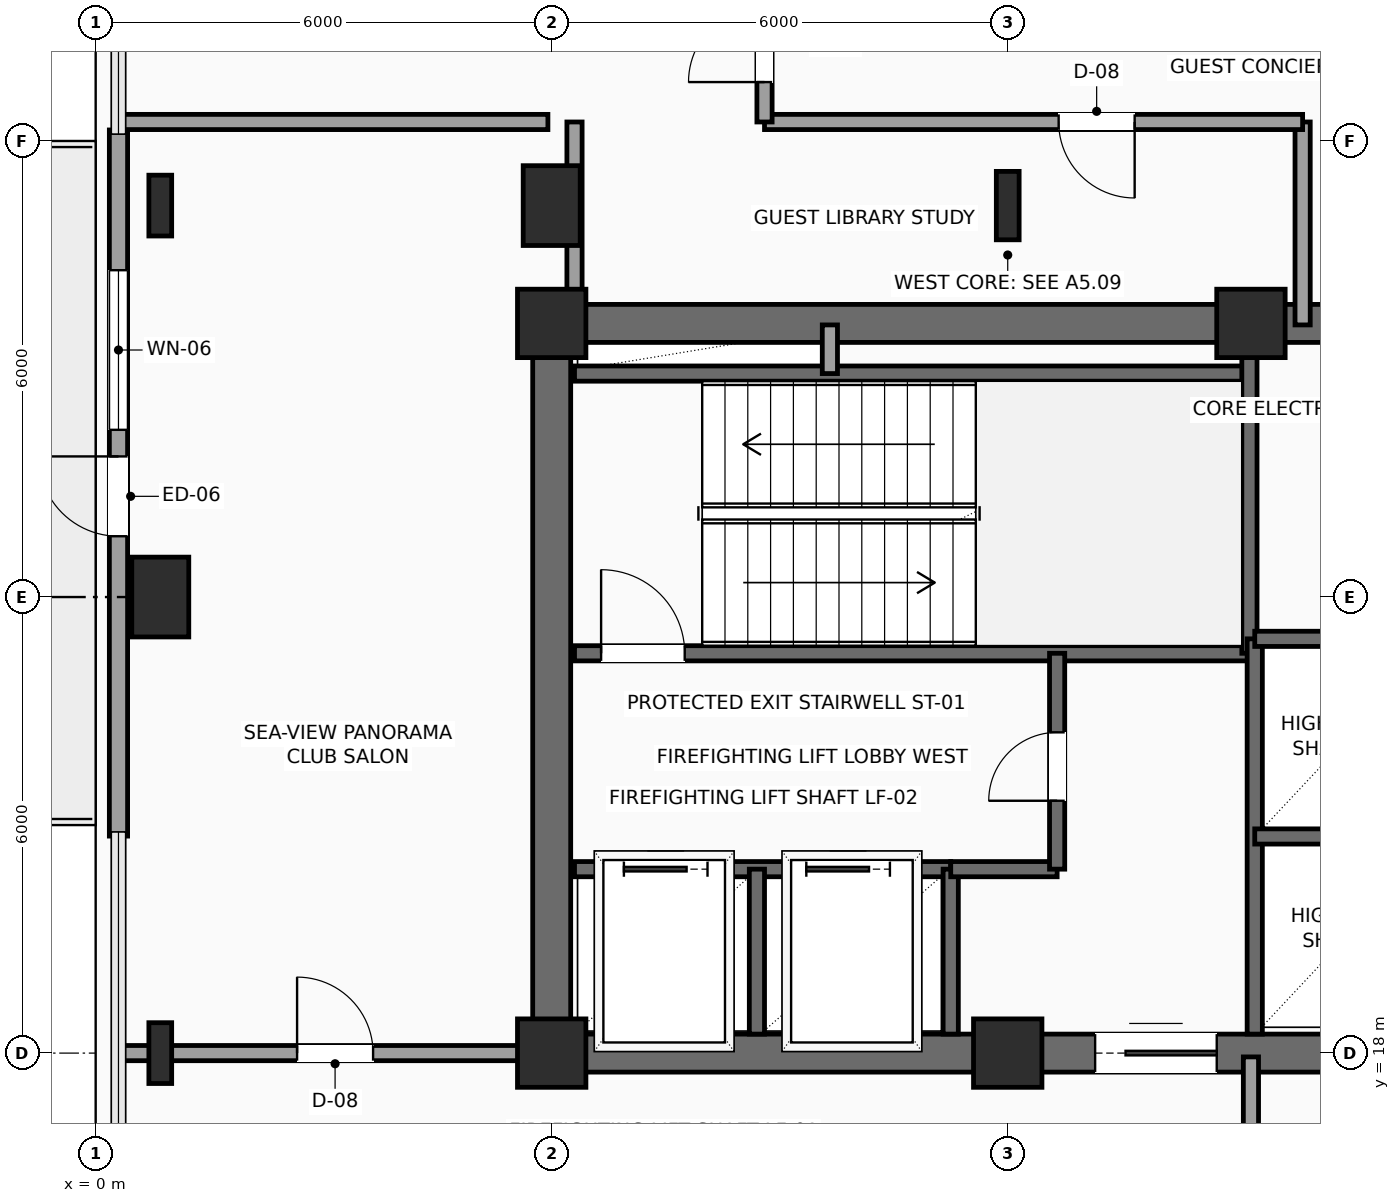
"""IFC4 building model, lengths in metres.
Left out: names, types, materials, properties, quantities, classifications, styles, units other than length and angle.
Written with IfcOpenShell. Run it as: python <this file> out.ifc"""

import sys

from ifc_helpers import new_model, si_unit, direction, frame, frame_2d, origin, origin_2d, place, context, subcontext, project, spatial, rectangle, i_section, extrude, element, fill, save


model = new_model("IFC4")
c1 = context("Model", 3, precision=1e-05, world=origin(), true_north=direction((0.0, 1.0)))
c2 = subcontext(c1, "Body", "Model", "MODEL_VIEW")
j1 = project(units=[si_unit("LENGTHUNIT", "METRE"), si_unit("PLANEANGLEUNIT", "RADIAN")], contexts=[c1])
p1 = place(None, origin())
s1 = spatial("IfcSite", under=j1, at=p1, CompositionType="ELEMENT")
p2 = place(p1, origin())
s2 = spatial("IfcBuilding", under=s1, at=p2, CompositionType="ELEMENT")
p3 = place(p2, frame((0.0, 0.0, 169.2)))
s3 = spatial("IfcBuildingStorey", under=s2, at=p3, CompositionType="ELEMENT", Elevation=169.2)
for number, where, z_axis, x_axis in (
    (1, (6.0, 18.0, 0.0), (0.0, 0.0, 1.0), (1.0, 0.0, 0.0)),
    (2, (12.0, 18.0, 0.0), (0.0, 0.0, 1.0), (1.0, 0.0, 0.0)),
    (3, (6.0, 27.6, 0.0), (0.0, 0.0, 1.0), (1.0, 0.0, 0.0)),
    (4, (15.2, 27.6, 0.0), (0.0, 0.0, 1.0), (1.0, 0.0, 0.0)),
):
    element("IfcColumn", number, at=place(p3, frame(where, z_axis=z_axis, x_axis=x_axis)), inside=s3, PredefinedType="COLUMN", context=c2, shape_type="SweptSolid", body=[
        extrude(rectangle(XDim=0.9, YDim=0.9, at=origin_2d()), origin(), (0.0, 0.0, 1.0), 3.75),
    ])
p4 = place(p3, frame((0.85, 18.0, 0.0), z_axis=(0.0, 0.0, 1.0), x_axis=(1.0, 0.0, 0.0)))
e5 = element("IfcColumn", 5, at=p4, inside=s3, PredefinedType="COLUMN", context=c2, shape_type="SweptSolid", body=[
    extrude(i_section(OverallWidth=0.3, OverallDepth=0.8, WebThickness=0.018, FlangeThickness=0.033, FilletRadius=0.03, at=origin_2d()), origin(), (0.0, 0.0, 1.0), 3.75),
])
p5 = place(p3, frame((0.85, 24.0, 0.0), z_axis=(0.0, 0.0, 1.0), x_axis=(1.0, 0.0, 0.0)))
e6 = element("IfcColumn", 6, at=p5, inside=s3, PredefinedType="COLUMN", context=c2, shape_type="SweptSolid", body=[
    extrude(rectangle(XDim=0.75, YDim=1.05, at=origin_2d()), origin(), (0.0, 0.0, 1.0), 3.75),
])
p6 = place(p3, frame((0.85, 29.15, 0.0), z_axis=(0.0, 0.0, 1.0), x_axis=(1.0, 0.0, 0.0)))
e7 = element("IfcColumn", 7, at=p6, inside=s3, PredefinedType="COLUMN", context=c2, shape_type="SweptSolid", body=[
    extrude(i_section(OverallWidth=0.3, OverallDepth=0.8, WebThickness=0.018, FlangeThickness=0.033, FilletRadius=0.03, at=origin_2d()), origin(), (0.0, 0.0, 1.0), 3.75),
])
p7 = place(p3, frame((6.0, 29.15, 0.0), z_axis=(0.0, 0.0, 1.0), x_axis=(1.0, 0.0, 0.0)))
e8 = element("IfcColumn", 8, at=p7, inside=s3, PredefinedType="COLUMN", context=c2, shape_type="SweptSolid", body=[
    extrude(rectangle(XDim=0.75, YDim=1.05, at=origin_2d()), origin(), (0.0, 0.0, 1.0), 3.75),
])
p8 = place(p3, frame((12.0, 29.15, 0.0), z_axis=(0.0, 0.0, 1.0), x_axis=(1.0, 0.0, 0.0)))
e9 = element("IfcColumn", 9, at=p8, inside=s3, PredefinedType="COLUMN", context=c2, shape_type="SweptSolid", body=[
    extrude(i_section(OverallWidth=0.3, OverallDepth=0.9, WebThickness=0.019, FlangeThickness=0.035, FilletRadius=0.03, at=origin_2d()), origin(), (0.0, 0.0, 1.0), 3.75),
])
p9 = place(p3, frame((0.3, 20.855, 0.0), z_axis=(0.0, 0.0, 1.0), x_axis=(0.0, 1.0, 0.0)))
e10 = element("IfcWall", 10, at=p9, inside=s3, PredefinedType="SOLIDWALL", context=c2, shape_type="SweptSolid", body=[
    extrude(rectangle(XDim=9.29, YDim=0.24, at=frame_2d((4.645, 0.0))), origin(), (0.0, 0.0, 1.0), 3.54),
])
p10 = place(p9, frame((3.945, 0.0, 0.0)))
e11 = element("IfcOpeningElement", 11, at=p10, cuts=e10, PredefinedType="OPENING", context=c2, shape_type="SweptSolid", body=[
    extrude(rectangle(XDim=1.05, YDim=2.2, at=frame_2d((0.525, 1.1))), frame((0.0, 0.13, 0.0), z_axis=(0.0, -1.0, 0.0), x_axis=(1.0, 0.0, 0.0)), (0.0, 0.0, 1.0), 0.26),
])
p11 = place(p9, frame((5.345, 0.0, 0.85)))
e12 = element("IfcOpeningElement", 12, at=p11, cuts=e10, PredefinedType="OPENING", context=c2, shape_type="SweptSolid", body=[
    extrude(rectangle(XDim=2.1, YDim=2.2, at=frame_2d((1.05, 1.1))), frame((0.0, 0.13, 0.0), z_axis=(0.0, -1.0, 0.0), x_axis=(1.0, 0.0, 0.0)), (0.0, 0.0, 1.0), 0.26),
])
p12 = place(p3, frame((6.0, 18.0, 0.0), z_axis=(0.0, 0.0, 1.0), x_axis=(1.0, 0.0, 0.0)))
e13 = element("IfcWall", 13, at=p12, inside=s3, PredefinedType="SHEAR", context=c2, shape_type="SweptSolid", body=[
    extrude(rectangle(XDim=12.0, YDim=0.5, at=frame_2d((6.0, 0.0))), origin(), (0.0, 0.0, 1.0), 3.54),
])
p13 = place(p12, frame((7.15, 0.0, 0.0)))
e14 = element("IfcOpeningElement", 14, at=p13, cuts=e13, PredefinedType="OPENING", context=c2, shape_type="SweptSolid", body=[
    extrude(rectangle(XDim=1.6, YDim=2.3, at=frame_2d((0.8, 1.15))), frame((0.0, 0.26, 0.0), z_axis=(0.0, -1.0, 0.0), x_axis=(1.0, 0.0, 0.0)), (0.0, 0.0, 1.0), 0.52),
])
p14 = place(p3, frame((6.0, 27.6, 0.0), z_axis=(0.0, 0.0, 1.0), x_axis=(1.0, 0.0, 0.0)))
e15 = element("IfcWall", 15, at=p14, inside=s3, PredefinedType="SHEAR", context=c2, shape_type="SweptSolid", body=[
    extrude(rectangle(XDim=12.0, YDim=0.5, at=frame_2d((6.0, 0.0))), origin(), (0.0, 0.0, 1.0), 3.54),
])
p15 = place(p14, frame((10.2, 0.0, 0.0)))
e16 = element("IfcOpeningElement", 16, at=p15, cuts=e15, PredefinedType="OPENING", context=c2, shape_type="SweptSolid", body=[
    extrude(rectangle(XDim=0.9, YDim=2.15, at=frame_2d((0.45, 1.075))), frame((0.0, 0.26, 0.0), z_axis=(0.0, -1.0, 0.0), x_axis=(1.0, 0.0, 0.0)), (0.0, 0.0, 1.0), 0.52),
])
p16 = place(p3, frame((6.0, 18.0, 0.0), z_axis=(0.0, 0.0, 1.0), x_axis=(0.0, 1.0, 0.0)))
e17 = element("IfcWall", 17, at=p16, inside=s3, PredefinedType="SHEAR", context=c2, shape_type="SweptSolid", body=[
    extrude(rectangle(XDim=9.6, YDim=0.5, at=frame_2d((4.8, 0.0))), origin(), (0.0, 0.0, 1.0), 3.54),
])
p17 = place(p3, frame((6.3, 23.26, 0.0), z_axis=(0.0, 0.0, 1.0), x_axis=(1.0, 0.0, 0.0)))
e18 = element("IfcWall", 18, at=p17, inside=s3, PredefinedType="SHEAR", context=c2, shape_type="SweptSolid", body=[
    extrude(rectangle(XDim=8.88, YDim=0.2, at=frame_2d((4.44, 0.0))), origin(), (0.0, 0.0, 1.0), 3.54),
])
p18 = place(p17, frame((0.35, 0.0, 0.0)))
e19 = element("IfcOpeningElement", 19, at=p18, cuts=e18, PredefinedType="OPENING", context=c2, shape_type="SweptSolid", body=[
    extrude(rectangle(XDim=1.1, YDim=2.2, at=frame_2d((0.55, 1.1))), frame((0.0, 0.11, 0.0), z_axis=(0.0, -1.0, 0.0), x_axis=(1.0, 0.0, 0.0)), (0.0, 0.0, 1.0), 0.22),
])
p19 = place(p3, frame((6.3, 26.94, 0.0), z_axis=(0.0, 0.0, 1.0), x_axis=(1.0, 0.0, 0.0)))
e20 = element("IfcWall", 20, at=p19, inside=s3, PredefinedType="SHEAR", context=c2, shape_type="SweptSolid", body=[
    extrude(rectangle(XDim=8.88, YDim=0.2, at=frame_2d((4.44, 0.0))), origin(), (0.0, 0.0, 1.0), 3.54),
])
p20 = place(p3, frame((15.18, 23.26, 0.0), z_axis=(0.0, 0.0, 1.0), x_axis=(0.0, 1.0, 0.0)))
e21 = element("IfcWall", 21, at=p20, inside=s3, PredefinedType="SHEAR", context=c2, shape_type="SweptSolid", body=[
    extrude(rectangle(XDim=4.04, YDim=0.2, at=frame_2d((2.02, 0.0))), origin(), (0.0, 0.0, 1.0), 3.54),
])
p21 = place(p3, frame((6.3, 20.42, 0.0), z_axis=(0.0, 0.0, 1.0), x_axis=(1.0, 0.0, 0.0)))
e22 = element("IfcWall", 22, at=p21, inside=s3, PredefinedType="SHEAR", context=c2, shape_type="SweptSolid", body=[
    extrude(rectangle(XDim=4.95, YDim=0.2, at=frame_2d((2.475, 0.0))), origin(), (0.0, 0.0, 1.0), 3.54),
])
p22 = place(p21, frame((0.65, 0.0, 0.0)))
e23 = element("IfcOpeningElement", 23, at=p22, cuts=e22, PredefinedType="OPENING", context=c2, shape_type="SweptSolid", body=[
    extrude(rectangle(XDim=1.1, YDim=2.2, at=frame_2d((0.55, 1.1))), frame((0.0, 0.11, 0.0), z_axis=(0.0, -1.0, 0.0), x_axis=(1.0, 0.0, 0.0)), (0.0, 0.0, 1.0), 0.22),
])
p23 = place(p21, frame((3.05, 0.0, 0.0)))
e24 = element("IfcOpeningElement", 24, at=p23, cuts=e22, PredefinedType="OPENING", context=c2, shape_type="SweptSolid", body=[
    extrude(rectangle(XDim=1.1, YDim=2.2, at=frame_2d((0.55, 1.1))), frame((0.0, 0.11, 0.0), z_axis=(0.0, -1.0, 0.0), x_axis=(1.0, 0.0, 0.0)), (0.0, 0.0, 1.0), 0.22),
])
for number, where, z_axis, x_axis in (
    (25, (8.7, 18.25, 0.0), (0.0, 0.0, 1.0), (0.0, 1.0, 0.0)),
    (26, (11.25, 18.25, 0.0), (0.0, 0.0, 1.0), (0.0, 1.0, 0.0)),
):
    element("IfcWall", number, at=place(p3, frame(where, z_axis=z_axis, x_axis=x_axis)), inside=s3, PredefinedType="SHEAR", context=c2, shape_type="SweptSolid", body=[
        extrude(rectangle(XDim=2.17, YDim=0.2, at=frame_2d((1.085, 0.0))), origin(), (0.0, 0.0, 1.0), 3.54),
    ])
p24 = place(p3, frame((11.25, 20.42, 0.0), z_axis=(0.0, 0.0, 1.0), x_axis=(1.0, 0.0, 0.0)))
e27 = element("IfcWall", 27, at=p24, inside=s3, PredefinedType="SHEAR", context=c2, shape_type="SweptSolid", body=[
    extrude(rectangle(XDim=1.4, YDim=0.2, at=frame_2d((0.7, 0.0))), origin(), (0.0, 0.0, 1.0), 3.54),
])
p25 = place(p3, frame((12.65, 20.42, 0.0), z_axis=(0.0, 0.0, 1.0), x_axis=(0.0, 1.0, 0.0)))
e28 = element("IfcWall", 28, at=p25, inside=s3, PredefinedType="SHEAR", context=c2, shape_type="SweptSolid", body=[
    extrude(rectangle(XDim=2.84, YDim=0.2, at=frame_2d((1.42, 0.0))), origin(), (0.0, 0.0, 1.0), 3.54),
])
p26 = place(p25, frame((0.9, 0.0, 0.0)))
e29 = element("IfcOpeningElement", 29, at=p26, cuts=e28, PredefinedType="OPENING", context=c2, shape_type="SweptSolid", body=[
    extrude(rectangle(XDim=0.9, YDim=2.15, at=frame_2d((0.45, 1.075))), frame((0.0, 0.11, 0.0), z_axis=(0.0, -1.0, 0.0), x_axis=(1.0, 0.0, 0.0)), (0.0, 0.0, 1.0), 0.22),
])
p27 = place(p3, frame((9.66, 26.94, 0.0), z_axis=(0.0, 0.0, 1.0), x_axis=(0.0, 1.0, 0.0)))
e30 = element("IfcWall", 30, at=p27, inside=s3, PredefinedType="SOLIDWALL", context=c2, shape_type="SweptSolid", body=[
    extrude(rectangle(XDim=0.64, YDim=0.2, at=frame_2d((0.32, 0.0))), origin(), (0.0, 0.0, 1.0), 3.54),
])
p28 = place(p3, frame((15.25, 18.25, 0.0), z_axis=(0.0, 0.0, 1.0), x_axis=(0.0, 1.0, 0.0)))
e31 = element("IfcWall", 31, at=p28, inside=s3, PredefinedType="SHEAR", context=c2, shape_type="SweptSolid", body=[
    extrude(rectangle(XDim=5.2, YDim=0.2, at=frame_2d((2.6, 0.0))), origin(), (0.0, 0.0, 1.0), 3.54),
])
p29 = place(p3, frame((15.25, 20.85, 0.0), z_axis=(0.0, 0.0, 1.0), x_axis=(1.0, 0.0, 0.0)))
e32 = element("IfcWall", 32, at=p29, inside=s3, PredefinedType="SHEAR", context=c2, shape_type="SweptSolid", body=[
    extrude(rectangle(XDim=2.4, YDim=0.2, at=frame_2d((1.2, 0.0))), origin(), (0.0, 0.0, 1.0), 3.54),
])
p30 = place(p3, frame((15.25, 23.45, 0.0), z_axis=(0.0, 0.0, 1.0), x_axis=(1.0, 0.0, 0.0)))
e33 = element("IfcWall", 33, at=p30, inside=s3, PredefinedType="SHEAR", context=c2, shape_type="SweptSolid", body=[
    extrude(rectangle(XDim=2.45, YDim=0.2, at=frame_2d((1.225, 0.0))), origin(), (0.0, 0.0, 1.0), 3.54),
])
p31 = place(p3, frame((15.2, 17.95, 0.0), z_axis=(0.0, 0.0, 1.0), x_axis=(0.0, -1.0, 0.0)))
e34 = element("IfcWall", 34, at=p31, inside=s3, PredefinedType="PARTITIONING", context=c2, shape_type="SweptSolid", body=[
    extrude(rectangle(XDim=1.7, YDim=0.2, at=frame_2d((0.85, 0.0))), origin(), (0.0, 0.0, 1.0), 3.54),
])
p32 = place(p3, frame((15.88, 27.58, 0.0), z_axis=(0.0, 0.0, 1.0), x_axis=(0.0, 1.0, 0.0)))
e35 = element("IfcWall", 35, at=p32, inside=s3, PredefinedType="PARTITIONING", context=c2, shape_type="SweptSolid", body=[
    extrude(rectangle(XDim=2.67, YDim=0.2, at=frame_2d((1.335, 0.0))), origin(), (0.0, 0.0, 1.0), 3.54),
])
p33 = place(p3, frame((15.88, 30.25, 0.0), z_axis=(0.0, 0.0, 1.0), x_axis=(-1.0, 0.0, 0.0)))
e36 = element("IfcWall", 36, at=p33, inside=s3, PredefinedType="PARTITIONING", context=c2, shape_type="SweptSolid", body=[
    extrude(rectangle(XDim=7.08, YDim=0.2, at=frame_2d((3.54, 0.0))), origin(), (0.0, 0.0, 1.0), 3.54),
])
p34 = place(p33, frame((2.21, 0.0, 0.0)))
e37 = element("IfcOpeningElement", 37, at=p34, cuts=e36, PredefinedType="OPENING", context=c2, shape_type="SweptSolid", body=[
    extrude(rectangle(XDim=1.0, YDim=2.2, at=frame_2d((0.5, 1.1))), frame((0.0, 0.11, 0.0), z_axis=(0.0, -1.0, 0.0), x_axis=(1.0, 0.0, 0.0)), (0.0, 0.0, 1.0), 0.22),
])
p35 = place(p3, frame((8.8, 30.25, 0.0), z_axis=(0.0, 0.0, 1.0), x_axis=(0.0, 1.0, 0.0)))
e38 = element("IfcWall", 38, at=p35, inside=s3, PredefinedType="PARTITIONING", context=c2, shape_type="SweptSolid", body=[
    extrude(rectangle(XDim=2.05, YDim=0.2, at=frame_2d((1.025, 0.0))), origin(), (0.0, 0.0, 1.0), 3.54),
])
p36 = place(p35, frame((0.525, 0.0, 0.0)))
e39 = element("IfcOpeningElement", 39, at=p36, cuts=e38, PredefinedType="OPENING", context=c2, shape_type="SweptSolid", body=[
    extrude(rectangle(XDim=1.0, YDim=2.2, at=frame_2d((0.5, 1.1))), frame((0.0, 0.11, 0.0), z_axis=(0.0, -1.0, 0.0), x_axis=(1.0, 0.0, 0.0)), (0.0, 0.0, 1.0), 0.22),
])
p37 = place(p3, frame((0.3, 18.0, 0.0), z_axis=(0.0, 0.0, 1.0), x_axis=(1.0, 0.0, 0.0)))
e40 = element("IfcWall", 40, at=p37, inside=s3, PredefinedType="PARTITIONING", context=c2, shape_type="SweptSolid", body=[
    extrude(rectangle(XDim=5.65, YDim=0.2, at=frame_2d((2.825, 0.0))), origin(), (0.0, 0.0, 1.0), 3.132),
])
p38 = place(p37, frame((2.35, 0.0, 0.0)))
e41 = element("IfcOpeningElement", 41, at=p38, cuts=e40, PredefinedType="OPENING", context=c2, shape_type="SweptSolid", body=[
    extrude(rectangle(XDim=1.0, YDim=2.2, at=frame_2d((0.5, 1.1))), frame((0.0, 0.11, 0.0), z_axis=(0.0, -1.0, 0.0), x_axis=(1.0, 0.0, 0.0)), (0.0, 0.0, 1.0), 0.22),
])
p39 = place(p3, frame((0.3, 30.25, 0.0), z_axis=(0.0, 0.0, 1.0), x_axis=(1.0, 0.0, 0.0)))
e42 = element("IfcWall", 42, at=p39, inside=s3, PredefinedType="PARTITIONING", context=c2, shape_type="SweptSolid", body=[
    extrude(rectangle(XDim=5.65, YDim=0.2, at=frame_2d((2.825, 0.0))), origin(), (0.0, 0.0, 1.0), 3.54),
])
p40 = place(p3, frame((6.3, 27.65, 0.0), z_axis=(0.0, 0.0, 1.0), x_axis=(0.0, 1.0, 0.0)))
e43 = element("IfcWall", 43, at=p40, inside=s3, PredefinedType="PARTITIONING", context=c2, shape_type="SweptSolid", body=[
    extrude(rectangle(XDim=2.6, YDim=0.2, at=frame_2d((1.3, 0.0))), origin(), (0.0, 0.0, 1.0), 3.132),
])
p41 = place(p10, origin())
e44 = element("IfcDoor", 44, at=p41, inside=s3, OperationType="SINGLE_SWING_RIGHT", PredefinedType="DOOR", context=c2, shape_type="SweptSolid", body=[
    extrude(rectangle(XDim=1.05, YDim=2.2, at=frame_2d((0.525, 1.1))), frame((0.0, 0.025, 0.0), z_axis=(0.0, -1.0, 0.0), x_axis=(1.0, 0.0, 0.0)), (0.0, 0.0, 1.0), 0.05),
])
fill(e11, e44)
p42 = place(p11, origin())
e45 = element("IfcWindow", 45, at=p42, inside=s3, PartitioningType="SINGLE_PANEL", PredefinedType="WINDOW", context=c2, shape_type="SweptSolid", body=[
    extrude(rectangle(XDim=2.1, YDim=2.2, at=frame_2d((1.05, 1.1))), frame((0.0, 0.03, 0.0), z_axis=(0.0, -1.0, 0.0), x_axis=(1.0, 0.0, 0.0)), (0.0, 0.0, 1.0), 0.06),
])
fill(e12, e45)
p43 = place(p13, origin())
e46 = element("IfcDoor", 46, at=p43, inside=s3, OperationType="DOUBLE_DOOR_SLIDING", PredefinedType="DOOR", context=c2, shape_type="SweptSolid", body=[
    extrude(rectangle(XDim=1.6, YDim=2.3, at=frame_2d((0.8, 1.15))), frame((0.0, 0.025, 0.0), z_axis=(0.0, -1.0, 0.0), x_axis=(1.0, 0.0, 0.0)), (0.0, 0.0, 1.0), 0.05),
])
fill(e14, e46)
p44 = place(p18, origin())
e47 = element("IfcDoor", 47, at=p44, inside=s3, OperationType="SINGLE_SWING_LEFT", PredefinedType="DOOR", context=c2, shape_type="SweptSolid", body=[
    extrude(rectangle(XDim=1.1, YDim=2.2, at=frame_2d((0.55, 1.1))), frame((0.0, 0.025, 0.0), z_axis=(0.0, -1.0, 0.0), x_axis=(1.0, 0.0, 0.0)), (0.0, 0.0, 1.0), 0.05),
])
fill(e19, e47)
p45 = place(p22, origin())
e48 = element("IfcDoor", 48, at=p45, inside=s3, OperationType="SLIDING_TO_LEFT", PredefinedType="DOOR", context=c2, shape_type="SweptSolid", body=[
    extrude(rectangle(XDim=1.1, YDim=2.2, at=frame_2d((0.55, 1.1))), frame((0.0, 0.025, 0.0), z_axis=(0.0, -1.0, 0.0), x_axis=(1.0, 0.0, 0.0)), (0.0, 0.0, 1.0), 0.05),
])
fill(e23, e48)
p46 = place(p23, origin())
e49 = element("IfcDoor", 49, at=p46, inside=s3, OperationType="SLIDING_TO_LEFT", PredefinedType="DOOR", context=c2, shape_type="SweptSolid", body=[
    extrude(rectangle(XDim=1.1, YDim=2.2, at=frame_2d((0.55, 1.1))), frame((0.0, 0.025, 0.0), z_axis=(0.0, -1.0, 0.0), x_axis=(1.0, 0.0, 0.0)), (0.0, 0.0, 1.0), 0.05),
])
fill(e24, e49)
p47 = place(p26, origin())
e50 = element("IfcDoor", 50, at=p47, inside=s3, OperationType="SINGLE_SWING_LEFT", PredefinedType="DOOR", context=c2, shape_type="SweptSolid", body=[
    extrude(rectangle(XDim=0.9, YDim=2.15, at=frame_2d((0.45, 1.075))), frame((0.0, 0.025, 0.0), z_axis=(0.0, -1.0, 0.0), x_axis=(1.0, 0.0, 0.0)), (0.0, 0.0, 1.0), 0.05),
])
fill(e29, e50)
p48 = place(p34, origin())
e51 = element("IfcDoor", 51, at=p48, inside=s3, OperationType="SINGLE_SWING_LEFT", PredefinedType="DOOR", context=c2, shape_type="SweptSolid", body=[
    extrude(rectangle(XDim=1.0, YDim=2.2, at=frame_2d((0.5, 1.1))), frame((0.0, 0.025, 0.0), z_axis=(0.0, -1.0, 0.0), x_axis=(1.0, 0.0, 0.0)), (0.0, 0.0, 1.0), 0.05),
])
fill(e37, e51)
p49 = place(p36, origin())
e52 = element("IfcDoor", 52, at=p49, inside=s3, OperationType="SINGLE_SWING_LEFT", PredefinedType="DOOR", context=c2, shape_type="SweptSolid", body=[
    extrude(rectangle(XDim=1.0, YDim=2.2, at=frame_2d((0.5, 1.1))), frame((0.0, 0.025, 0.0), z_axis=(0.0, -1.0, 0.0), x_axis=(1.0, 0.0, 0.0)), (0.0, 0.0, 1.0), 0.05),
])
fill(e39, e52)
p50 = place(p38, origin())
e53 = element("IfcDoor", 53, at=p50, inside=s3, OperationType="SINGLE_SWING_LEFT", PredefinedType="DOOR", context=c2, shape_type="SweptSolid", body=[
    extrude(rectangle(XDim=1.0, YDim=2.2, at=frame_2d((0.5, 1.1))), frame((0.0, 0.025, 0.0), z_axis=(0.0, -1.0, 0.0), x_axis=(1.0, 0.0, 0.0)), (0.0, 0.0, 1.0), 0.05),
])
fill(e41, e53)
save(model, sys.argv[1])
